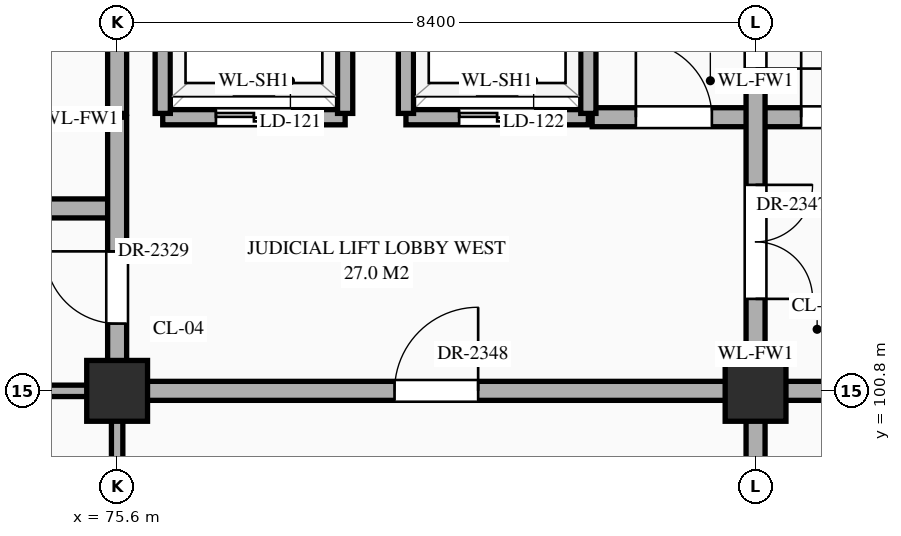
"""IFC4 building model, lengths in metres.
Left out: names, types, materials, properties, quantities, classifications, styles, units other than length and angle.
Written with IfcOpenShell. Run it as: python <this file> out.ifc"""

import sys

from ifc_helpers import new_model, si_unit, direction, frame, frame_2d, origin, origin_2d, place, context, subcontext, project, spatial, rectangle, extrude, element, fill, save


model = new_model("IFC4")
c1 = context("Model", 3, precision=1e-05, world=origin(), true_north=direction((0.0, 1.0)))
c2 = subcontext(c1, "Body", "Model", "MODEL_VIEW")
j1 = project(units=[si_unit("LENGTHUNIT", "METRE"), si_unit("PLANEANGLEUNIT", "RADIAN")], contexts=[c1])
p1 = place(None, origin())
s1 = spatial("IfcSite", under=j1, at=p1, CompositionType="ELEMENT")
p2 = place(p1, origin())
s2 = spatial("IfcBuilding", under=s1, at=p2, CompositionType="ELEMENT")
p3 = place(p2, frame((0.0, 0.0, 30.6)))
s3 = spatial("IfcBuildingStorey", under=s2, at=p3, CompositionType="ELEMENT", Elevation=30.6)
for number, where, z_axis, x_axis in (
    (1, (75.6, 100.8, 0.0), (0.0, 0.0, 1.0), (1.0, 0.0, 0.0)),
    (2, (84.0, 100.8, 0.0), (0.0, 0.0, 1.0), (1.0, 0.0, 0.0)),
):
    element("IfcColumn", number, at=place(p3, frame(where, z_axis=z_axis, x_axis=x_axis)), inside=s3, PredefinedType="COLUMN", context=c2, shape_type="SweptSolid", body=[
        extrude(rectangle(XDim=0.8, YDim=0.8, at=origin_2d()), origin(), (0.0, 0.0, 1.0), 4.5),
    ])
p4 = place(p3, frame((71.4, 100.8, 0.0), z_axis=(0.0, 0.0, 1.0), x_axis=(1.0, 0.0, 0.0)))
e3 = element("IfcWall", 3, at=p4, inside=s3, PredefinedType="STANDARD", context=c2, shape_type="SweptSolid", body=[
    extrude(rectangle(XDim=4.2, YDim=0.15, at=frame_2d((2.1, 0.0))), origin(), (0.0, 0.0, 1.0), 3.39),
])
p5 = place(p4, frame((1.36, 0.0, 0.0)))
e4 = element("IfcOpeningElement", 4, at=p5, cuts=e3, PredefinedType="OPENING", context=c2, shape_type="SweptSolid", body=[
    extrude(rectangle(XDim=1.16, YDim=2.3, at=frame_2d((0.58, 1.15))), frame((0.0, 0.087, 0.0), z_axis=(0.0, -1.0, 0.0), x_axis=(1.0, 0.0, 0.0)), (0.0, 0.0, 1.0), 0.174),
])
p6 = place(p3, frame((75.6, 100.8, 0.0), z_axis=(0.0, 0.0, 1.0), x_axis=(1.0, 0.0, 0.0)))
e5 = element("IfcWall", 5, at=p6, inside=s3, PredefinedType="STANDARD", context=c2, shape_type="SweptSolid", body=[
    extrude(rectangle(XDim=16.8, YDim=0.25, at=frame_2d((8.4, 0.0))), origin(), (0.0, 0.0, 1.0), 3.39),
])
p7 = place(p6, frame((3.65, 0.0, 0.0)))
e6 = element("IfcOpeningElement", 6, at=p7, cuts=e5, PredefinedType="OPENING", context=c2, shape_type="SweptSolid", body=[
    extrude(rectangle(XDim=1.1, YDim=2.2, at=frame_2d((0.55, 1.1))), frame((0.0, 0.137, 0.0), z_axis=(0.0, -1.0, 0.0), x_axis=(1.0, 0.0, 0.0)), (0.0, 0.0, 1.0), 0.274),
])
p8 = place(p6, frame((9.785, 0.0, 0.0)))
e7 = element("IfcOpeningElement", 7, at=p8, cuts=e5, PredefinedType="OPENING", context=c2, shape_type="SweptSolid", body=[
    extrude(rectangle(XDim=0.95, YDim=2.15, at=frame_2d((0.475, 1.075))), frame((0.0, 0.137, 0.0), z_axis=(0.0, -1.0, 0.0), x_axis=(1.0, 0.0, 0.0)), (0.0, 0.0, 1.0), 0.274),
])
p9 = place(p6, frame((12.45, 0.0, 0.0)))
e8 = element("IfcOpeningElement", 8, at=p9, cuts=e5, PredefinedType="OPENING", context=c2, shape_type="SweptSolid", body=[
    extrude(rectangle(XDim=1.1, YDim=2.2, at=frame_2d((0.55, 1.1))), frame((0.0, 0.137, 0.0), z_axis=(0.0, -1.0, 0.0), x_axis=(1.0, 0.0, 0.0)), (0.0, 0.0, 1.0), 0.274),
])
p10 = place(p6, frame((14.84, 0.0, 0.0)))
e9 = element("IfcOpeningElement", 9, at=p10, cuts=e5, PredefinedType="OPENING", context=c2, shape_type="SweptSolid", body=[
    extrude(rectangle(XDim=1.0, YDim=2.2, at=frame_2d((0.5, 1.1))), frame((0.0, 0.137, 0.0), z_axis=(0.0, -1.0, 0.0), x_axis=(1.0, 0.0, 0.0)), (0.0, 0.0, 1.0), 0.274),
])
p11 = place(p3, frame((71.4, 103.2, 0.0), z_axis=(0.0, 0.0, 1.0), x_axis=(1.0, 0.0, 0.0)))
e10 = element("IfcWall", 10, at=p11, inside=s3, PredefinedType="STANDARD", context=c2, shape_type="SweptSolid", body=[
    extrude(rectangle(XDim=4.2, YDim=0.25, at=frame_2d((2.1, 0.0))), origin(), (0.0, 0.0, 1.0), 4.24),
])
p12 = place(p11, frame((1.6, 0.0, 0.0)))
e11 = element("IfcOpeningElement", 11, at=p12, cuts=e10, PredefinedType="OPENING", context=c2, shape_type="SweptSolid", body=[
    extrude(rectangle(XDim=1.0, YDim=2.2, at=frame_2d((0.5, 1.1))), frame((0.0, 0.137, 0.0), z_axis=(0.0, -1.0, 0.0), x_axis=(1.0, 0.0, 0.0)), (0.0, 0.0, 1.0), 0.274),
])
p13 = place(p3, frame((76.2, 104.4, 0.0), z_axis=(0.0, 0.0, 1.0), x_axis=(1.0, 0.0, 0.0)))
e12 = element("IfcWall", 12, at=p13, inside=s3, PredefinedType="STANDARD", context=c2, shape_type="SweptSolid", body=[
    extrude(rectangle(XDim=2.4, YDim=0.2, at=frame_2d((1.2, 0.0))), origin(), (0.0, 0.0, 1.0), 4.24),
])
p14 = place(p13, frame((0.7, 0.0, 0.0)))
e13 = element("IfcOpeningElement", 13, at=p14, cuts=e12, PredefinedType="OPENING", context=c2, shape_type="SweptSolid", body=[
    extrude(rectangle(XDim=1.0, YDim=2.15, at=frame_2d((0.5, 1.075))), frame((0.0, 0.112, 0.0), z_axis=(0.0, -1.0, 0.0), x_axis=(1.0, 0.0, 0.0)), (0.0, 0.0, 1.0), 0.224),
])
p15 = place(p3, frame((79.4, 104.4, 0.0), z_axis=(0.0, 0.0, 1.0), x_axis=(1.0, 0.0, 0.0)))
e14 = element("IfcWall", 14, at=p15, inside=s3, PredefinedType="STANDARD", context=c2, shape_type="SweptSolid", body=[
    extrude(rectangle(XDim=2.4, YDim=0.2, at=frame_2d((1.2, 0.0))), origin(), (0.0, 0.0, 1.0), 4.24),
])
p16 = place(p15, frame((0.7, 0.0, 0.0)))
e15 = element("IfcOpeningElement", 15, at=p16, cuts=e14, PredefinedType="OPENING", context=c2, shape_type="SweptSolid", body=[
    extrude(rectangle(XDim=1.0, YDim=2.15, at=frame_2d((0.5, 1.075))), frame((0.0, 0.112, 0.0), z_axis=(0.0, -1.0, 0.0), x_axis=(1.0, 0.0, 0.0)), (0.0, 0.0, 1.0), 0.224),
])
p17 = place(p3, frame((81.85, 104.4, 0.0), z_axis=(0.0, 0.0, 1.0), x_axis=(1.0, 0.0, 0.0)))
e16 = element("IfcWall", 16, at=p17, inside=s3, PredefinedType="STANDARD", context=c2, shape_type="SweptSolid", body=[
    extrude(rectangle(XDim=4.3, YDim=0.25, at=frame_2d((2.15, 0.0))), origin(), (0.0, 0.0, 1.0), 4.24),
])
p18 = place(p17, frame((0.575, 0.0, 0.0)))
e17 = element("IfcOpeningElement", 17, at=p18, cuts=e16, PredefinedType="OPENING", context=c2, shape_type="SweptSolid", body=[
    extrude(rectangle(XDim=1.0, YDim=2.2, at=frame_2d((0.5, 1.1))), frame((0.0, 0.137, 0.0), z_axis=(0.0, -1.0, 0.0), x_axis=(1.0, 0.0, 0.0)), (0.0, 0.0, 1.0), 0.274),
])
p19 = place(p17, frame((2.75, 0.0, 0.0)))
e18 = element("IfcOpeningElement", 18, at=p19, cuts=e16, PredefinedType="OPENING", context=c2, shape_type="SweptSolid", body=[
    extrude(rectangle(XDim=0.95, YDim=2.15, at=frame_2d((0.475, 1.075))), frame((0.0, 0.137, 0.0), z_axis=(0.0, -1.0, 0.0), x_axis=(1.0, 0.0, 0.0)), (0.0, 0.0, 1.0), 0.274),
])
p20 = place(p3, frame((75.6, 96.0, 0.0), z_axis=(0.0, 0.0, 1.0), x_axis=(0.0, 1.0, 0.0)))
e19 = element("IfcWall", 19, at=p20, inside=s3, PredefinedType="STANDARD", context=c2, shape_type="SweptSolid", body=[
    extrude(rectangle(XDim=4.8, YDim=0.15, at=frame_2d((2.4, 0.0))), origin(), (0.0, 0.0, 1.0), 3.49),
])
p21 = place(p3, frame((75.6, 100.8, 0.0), z_axis=(0.0, 0.0, 1.0), x_axis=(0.0, 1.0, 0.0)))
e20 = element("IfcWall", 20, at=p21, inside=s3, PredefinedType="STANDARD", context=c2, shape_type="SweptSolid", body=[
    extrude(rectangle(XDim=3.6, YDim=0.25, at=frame_2d((1.8, 0.0))), origin(), (0.0, 0.0, 1.0), 3.49),
])
p22 = place(p21, frame((0.885, 0.0, 0.0)))
e21 = element("IfcOpeningElement", 21, at=p22, cuts=e20, PredefinedType="OPENING", context=c2, shape_type="SweptSolid", body=[
    extrude(rectangle(XDim=0.95, YDim=2.15, at=frame_2d((0.475, 1.075))), frame((0.0, 0.137, 0.0), z_axis=(0.0, -1.0, 0.0), x_axis=(1.0, 0.0, 0.0)), (0.0, 0.0, 1.0), 0.274),
])
p23 = place(p3, frame((75.6, 104.45, 0.0), z_axis=(0.0, 0.0, 1.0), x_axis=(0.0, 1.0, 0.0)))
e22 = element("IfcWall", 22, at=p23, inside=s3, PredefinedType="STANDARD", context=c2, shape_type="SweptSolid", body=[
    extrude(rectangle(XDim=3.5, YDim=0.25, at=frame_2d((1.75, 0.0))), origin(), (0.0, 0.0, 1.0), 3.49),
])
for number, where, z_axis, x_axis in (
    (23, (76.2, 104.45, 0.0), (0.0, 0.0, 1.0), (0.0, 1.0, 0.0)),
    (24, (78.6, 104.45, 0.0), (0.0, 0.0, 1.0), (0.0, 1.0, 0.0)),
    (25, (79.4, 104.45, 0.0), (0.0, 0.0, 1.0), (0.0, 1.0, 0.0)),
    (26, (81.8, 104.45, 0.0), (0.0, 0.0, 1.0), (0.0, 1.0, 0.0)),
):
    element("IfcWall", number, at=place(p3, frame(where, z_axis=z_axis, x_axis=x_axis)), inside=s3, PredefinedType="STANDARD", context=c2, shape_type="SweptSolid", body=[
        extrude(rectangle(XDim=2.3, YDim=0.2, at=frame_2d((1.15, 0.0))), origin(), (0.0, 0.0, 1.0), 4.24),
    ])
p24 = place(p3, frame((84.0, 79.24, 0.0), z_axis=(0.0, 0.0, 1.0), x_axis=(0.0, 1.0, 0.0)))
e27 = element("IfcWall", 27, at=p24, inside=s3, PredefinedType="STANDARD", context=c2, shape_type="SweptSolid", body=[
    extrude(rectangle(XDim=35.92, YDim=0.25, at=frame_2d((17.96, 0.0))), origin(), (0.0, 0.0, 1.0), 3.49),
])
p25 = place(p24, frame((22.77, 0.0, 0.0)))
e28 = element("IfcOpeningElement", 28, at=p25, cuts=e27, PredefinedType="OPENING", context=c2, shape_type="SweptSolid", body=[
    extrude(rectangle(XDim=1.5, YDim=2.25, at=frame_2d((0.75, 1.125))), frame((0.0, 0.137, 0.0), z_axis=(0.0, -1.0, 0.0), x_axis=(1.0, 0.0, 0.0)), (0.0, 0.0, 1.0), 0.274),
])
p26 = place(p24, frame((12.525, 0.0, 0.0)))
e29 = element("IfcOpeningElement", 29, at=p26, cuts=e27, PredefinedType="OPENING", context=c2, shape_type="SweptSolid", body=[
    extrude(rectangle(XDim=0.95, YDim=2.15, at=frame_2d((0.475, 1.075))), frame((0.0, 0.137, 0.0), z_axis=(0.0, -1.0, 0.0), x_axis=(1.0, 0.0, 0.0)), (0.0, 0.0, 1.0), 0.274),
])
p27 = place(p24, frame((15.22, 0.0, 0.0)))
e30 = element("IfcOpeningElement", 30, at=p27, cuts=e27, PredefinedType="OPENING", context=c2, shape_type="SweptSolid", body=[
    extrude(rectangle(XDim=1.0, YDim=2.2, at=frame_2d((0.5, 1.1))), frame((0.0, 0.137, 0.0), z_axis=(0.0, -1.0, 0.0), x_axis=(1.0, 0.0, 0.0)), (0.0, 0.0, 1.0), 0.274),
])
p28 = place(p24, frame((25.8, 0.0, 0.0)))
e31 = element("IfcOpeningElement", 31, at=p28, cuts=e27, PredefinedType="OPENING", context=c2, shape_type="SweptSolid", body=[
    extrude(rectangle(XDim=2.0, YDim=2.4, at=frame_2d((1.0, 1.2))), frame((0.0, 0.137, 0.0), z_axis=(0.0, -1.0, 0.0), x_axis=(1.0, 0.0, 0.0)), (0.0, 0.0, 1.0), 0.274),
])
p29 = place(p24, frame((29.57, 0.0, 0.0)))
e32 = element("IfcOpeningElement", 32, at=p29, cuts=e27, PredefinedType="OPENING", context=c2, shape_type="SweptSolid", body=[
    extrude(rectangle(XDim=1.1, YDim=2.2, at=frame_2d((0.55, 1.1))), frame((0.0, 0.137, 0.0), z_axis=(0.0, -1.0, 0.0), x_axis=(1.0, 0.0, 0.0)), (0.0, 0.0, 1.0), 0.274),
])
p30 = place(p24, frame((5.25, 0.0, 0.0)))
e33 = element("IfcOpeningElement", 33, at=p30, cuts=e27, PredefinedType="OPENING", context=c2, shape_type="SweptSolid", body=[
    extrude(rectangle(XDim=1.1, YDim=2.2, at=frame_2d((0.55, 1.1))), frame((0.0, 0.137, 0.0), z_axis=(0.0, -1.0, 0.0), x_axis=(1.0, 0.0, 0.0)), (0.0, 0.0, 1.0), 0.274),
])
p31 = place(p14, origin())
e34 = element("IfcDoor", 34, at=p31, inside=s3, OperationType="DOUBLE_DOOR_SLIDING", PredefinedType="DOOR", context=c2, shape_type="SweptSolid", body=[
    extrude(rectangle(XDim=1.0, YDim=2.15, at=frame_2d((0.5, 1.075))), frame((0.0, 0.025, 0.0), z_axis=(0.0, -1.0, 0.0), x_axis=(1.0, 0.0, 0.0)), (0.0, 0.0, 1.0), 0.05),
])
fill(e13, e34)
p32 = place(p16, origin())
e35 = element("IfcDoor", 35, at=p32, inside=s3, OperationType="DOUBLE_DOOR_SLIDING", PredefinedType="DOOR", context=c2, shape_type="SweptSolid", body=[
    extrude(rectangle(XDim=1.0, YDim=2.15, at=frame_2d((0.5, 1.075))), frame((0.0, 0.025, 0.0), z_axis=(0.0, -1.0, 0.0), x_axis=(1.0, 0.0, 0.0)), (0.0, 0.0, 1.0), 0.05),
])
fill(e15, e35)
p33 = place(p22, origin())
e36 = element("IfcDoor", 36, at=p33, inside=s3, OperationType="SINGLE_SWING_RIGHT", PredefinedType="DOOR", context=c2, shape_type="SweptSolid", body=[
    extrude(rectangle(XDim=0.95, YDim=2.15, at=frame_2d((0.475, 1.075))), frame((0.0, 0.025, 0.0), z_axis=(0.0, -1.0, 0.0), x_axis=(1.0, 0.0, 0.0)), (0.0, 0.0, 1.0), 0.05),
])
fill(e21, e36)
p34 = place(p25, frame((1.5, 0.0, 0.0), z_axis=(0.0, 0.0, 1.0), x_axis=(-1.0, 0.0, 0.0)))
e37 = element("IfcDoor", 37, at=p34, inside=s3, OperationType="DOUBLE_DOOR_SINGLE_SWING", PredefinedType="DOOR", context=c2, shape_type="SweptSolid", body=[
    extrude(rectangle(XDim=1.5, YDim=2.25, at=frame_2d((0.75, 1.125))), frame((0.0, 0.025, 0.0), z_axis=(0.0, -1.0, 0.0), x_axis=(1.0, 0.0, 0.0)), (0.0, 0.0, 1.0), 0.05),
])
fill(e28, e37)
p35 = place(p7, origin())
e38 = element("IfcDoor", 38, at=p35, inside=s3, OperationType="SINGLE_SWING_RIGHT", PredefinedType="DOOR", context=c2, shape_type="SweptSolid", body=[
    extrude(rectangle(XDim=1.1, YDim=2.2, at=frame_2d((0.55, 1.1))), frame((0.0, 0.025, 0.0), z_axis=(0.0, -1.0, 0.0), x_axis=(1.0, 0.0, 0.0)), (0.0, 0.0, 1.0), 0.05),
])
fill(e6, e38)
p36 = place(p18, origin())
e39 = element("IfcDoor", 39, at=p36, inside=s3, OperationType="SINGLE_SWING_LEFT", PredefinedType="DOOR", context=c2, shape_type="SweptSolid", body=[
    extrude(rectangle(XDim=1.0, YDim=2.2, at=frame_2d((0.5, 1.1))), frame((0.0, 0.025, 0.0), z_axis=(0.0, -1.0, 0.0), x_axis=(1.0, 0.0, 0.0)), (0.0, 0.0, 1.0), 0.05),
])
fill(e17, e39)
p37 = place(p19, origin())
e40 = element("IfcDoor", 40, at=p37, inside=s3, OperationType="SINGLE_SWING_LEFT", PredefinedType="DOOR", context=c2, shape_type="SweptSolid", body=[
    extrude(rectangle(XDim=0.95, YDim=2.15, at=frame_2d((0.475, 1.075))), frame((0.0, 0.025, 0.0), z_axis=(0.0, -1.0, 0.0), x_axis=(1.0, 0.0, 0.0)), (0.0, 0.0, 1.0), 0.05),
])
fill(e18, e40)
p38 = place(p28, frame((2.0, 0.0, 0.0), z_axis=(0.0, 0.0, 1.0), x_axis=(-1.0, 0.0, 0.0)))
e41 = element("IfcDoor", 41, at=p38, inside=s3, OperationType="DOUBLE_DOOR_SINGLE_SWING", PredefinedType="DOOR", context=c2, shape_type="SweptSolid", body=[
    extrude(rectangle(XDim=2.0, YDim=2.4, at=frame_2d((1.0, 1.2))), frame((0.0, 0.025, 0.0), z_axis=(0.0, -1.0, 0.0), x_axis=(1.0, 0.0, 0.0)), (0.0, 0.0, 1.0), 0.05),
])
fill(e31, e41)
save(model, sys.argv[1])
